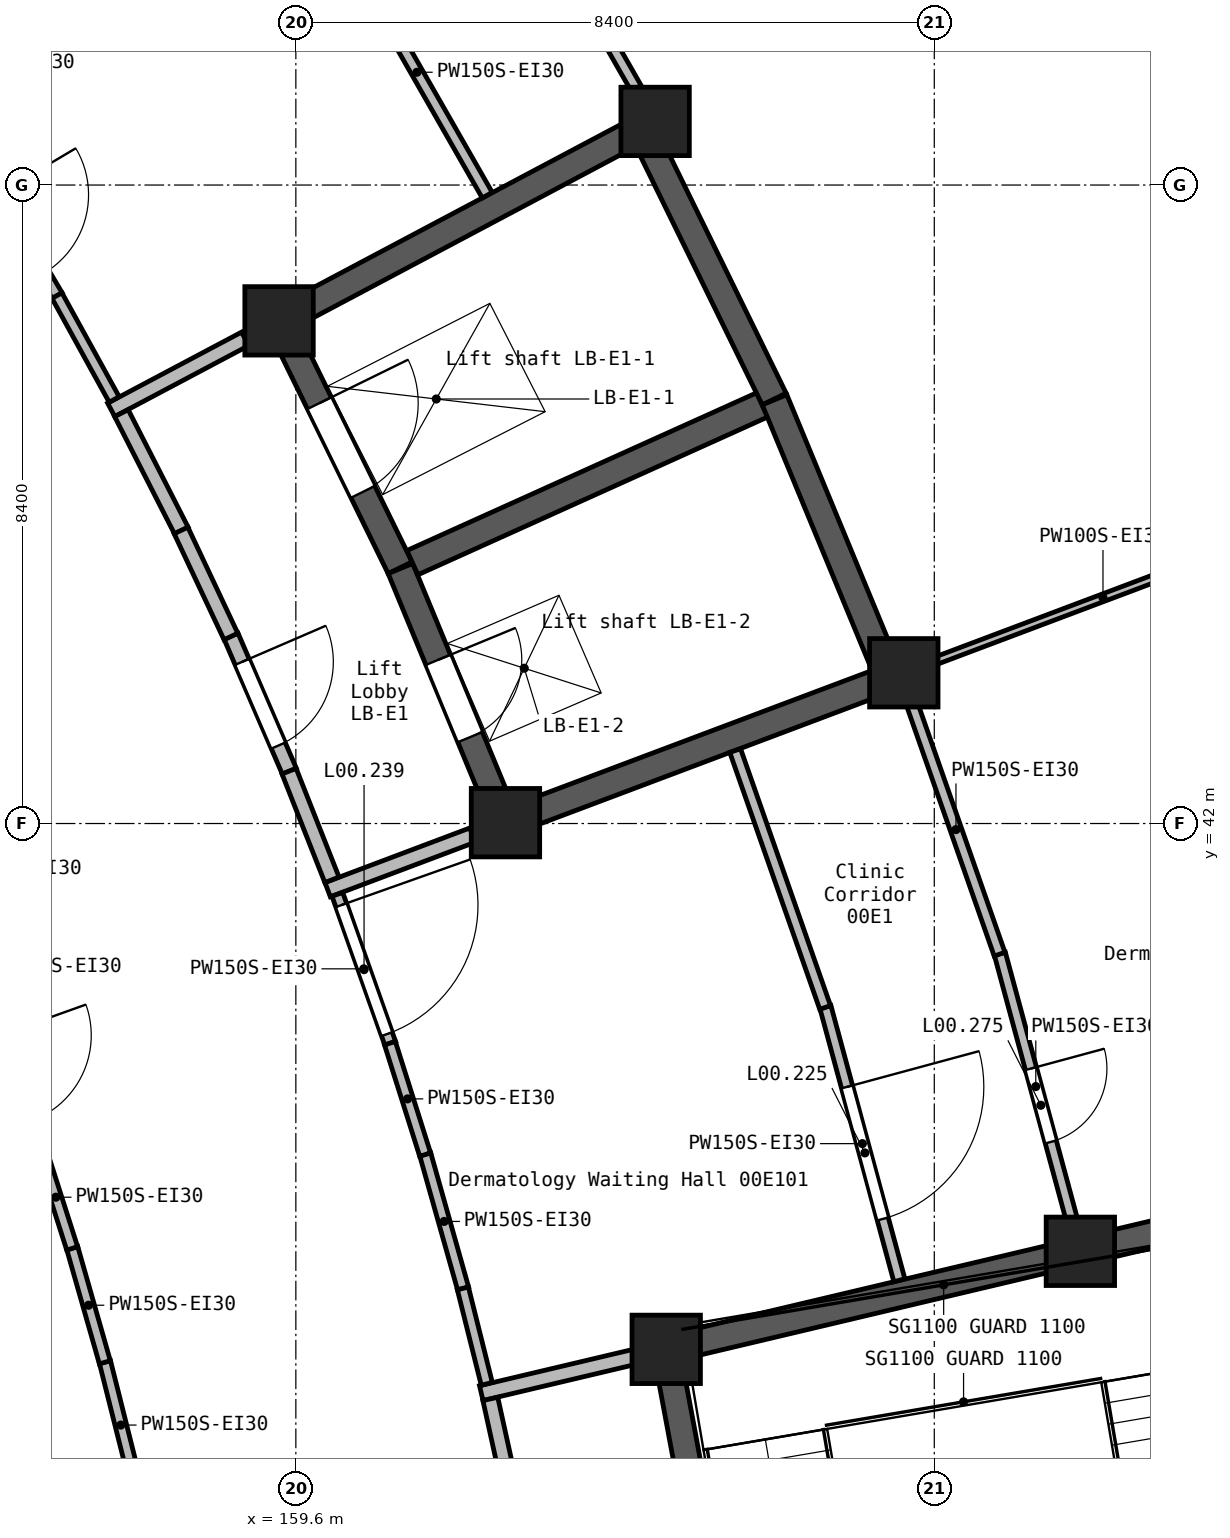
"""IFC4 building model, lengths in metres.
Left out: names, types, materials, properties, quantities, classifications, styles, units other than length and angle.
Written with IfcOpenShell. Run it as: python <this file> out.ifc"""

import sys

from ifc_helpers import new_model, si_unit, direction, frame, frame_2d, origin, origin_2d, place, context, subcontext, project, spatial, rectangle, extrude, element, fill, save


model = new_model("IFC4")
c1 = context("Model", 3, precision=1e-05, world=origin(), true_north=direction((0.0, 1.0)))
c2 = subcontext(c1, "Body", "Model", "MODEL_VIEW")
j1 = project(units=[si_unit("LENGTHUNIT", "METRE"), si_unit("PLANEANGLEUNIT", "RADIAN")], contexts=[c1])
p1 = place(None, origin())
s1 = spatial("IfcSite", under=j1, at=p1, CompositionType="ELEMENT")
p2 = place(p1, origin())
s2 = spatial("IfcBuilding", under=s1, at=p2, CompositionType="ELEMENT")
p3 = place(p2, origin())
s3 = spatial("IfcBuildingStorey", under=s2, at=p3, CompositionType="ELEMENT", Elevation=0.0)
for number, where, z_axis, x_axis in (
    (1, (159.379, 48.613, -0.3), (0.0, 0.0, 1.0), (1.0, 0.0, 0.0)),
    (2, (162.358, 42.011, -0.3), (0.0, 0.0, 1.0), (1.0, 0.0, 0.0)),
    (3, (164.327, 51.237, -0.3), (0.0, 0.0, 1.0), (1.0, 0.0, 0.0)),
    (4, (164.473, 35.082, -0.3), (0.0, 0.0, 1.0), (1.0, 0.0, 0.0)),
    (5, (167.599, 43.983, -0.3), (0.0, 0.0, 1.0), (1.0, 0.0, 0.0)),
    (6, (169.922, 36.372, -0.3), (0.0, 0.0, 1.0), (1.0, 0.0, 0.0)),
):
    element("IfcColumn", number, at=place(p3, frame(where, z_axis=z_axis, x_axis=x_axis)), inside=s3, PredefinedType="COLUMN", context=c2, shape_type="SweptSolid", body=[
        extrude(rectangle(XDim=0.9, YDim=0.9, at=origin_2d()), origin(), (0.0, 0.0, 1.0), 5.7),
    ])
p4 = place(p3, frame((159.224, 48.531, -0.3), z_axis=(0.0, 0.0, 1.0), x_axis=(0.883393138637, 0.468632652094, 0.0)))
e7 = element("IfcWall", 7, at=p4, inside=s3, PredefinedType="SHEAR", context=c2, shape_type="SweptSolid", body=[
    extrude(rectangle(XDim=5.751, YDim=0.35, at=frame_2d((2.875, 0.0))), origin(), (0.0, 0.0, 1.0), 5.7),
])
p5 = place(p3, frame((159.456, 48.456, -0.3), z_axis=(0.0, 0.0, 1.0), x_axis=(0.440221126053, -0.89788939195, 0.0)))
e8 = element("IfcWall", 8, at=p5, inside=s3, PredefinedType="SHEAR", context=c2, shape_type="SweptSolid", body=[
    extrude(rectangle(XDim=3.442, YDim=0.35, at=frame_2d((1.721, 0.0))), origin(), (0.0, 0.0, 1.0), 5.7),
])
p6 = place(p5, frame((1.031, 0.0, 0.3)))
e9 = element("IfcOpeningElement", 9, at=p6, cuts=e8, PredefinedType="OPENING", context=c2, shape_type="SweptSolid", body=[
    extrude(rectangle(XDim=1.3, YDim=2.1, at=frame_2d((0.65, 1.05))), frame((0.0, 0.185, 0.0), z_axis=(0.0, -1.0, 0.0), x_axis=(1.0, 0.0, 0.0)), (0.0, 0.0, 1.0), 0.37),
])
p7 = place(p3, frame((160.976, 45.355, -0.3), z_axis=(0.0, 0.0, 1.0), x_axis=(0.381990591944, -0.924166212143, 0.0)))
e10 = element("IfcWall", 10, at=p7, inside=s3, PredefinedType="SHEAR", context=c2, shape_type="SweptSolid", body=[
    extrude(rectangle(XDim=3.443, YDim=0.35, at=frame_2d((1.721, 0.0))), origin(), (0.0, 0.0, 1.0), 5.7),
])
p8 = place(p7, frame((1.3, 0.0, 0.3)))
e11 = element("IfcOpeningElement", 11, at=p8, cuts=e10, PredefinedType="OPENING", context=c2, shape_type="SweptSolid", body=[
    extrude(rectangle(XDim=1.1, YDim=2.1, at=frame_2d((0.55, 1.05))), frame((0.0, 0.185, 0.0), z_axis=(0.0, -1.0, 0.0), x_axis=(1.0, 0.0, 0.0)), (0.0, 0.0, 1.0), 0.37),
])
p9 = place(p3, frame((161.134, 45.432, -0.3), z_axis=(0.0, 0.0, 1.0), x_axis=(0.911564728385, 0.411156595427, 0.0)))
e12 = element("IfcWall", 12, at=p9, inside=s3, PredefinedType="SHEAR", context=c2, shape_type="SweptSolid", body=[
    extrude(rectangle(XDim=5.05, YDim=0.35, at=frame_2d((2.525, 0.0))), origin(), (0.0, 0.0, 1.0), 5.7),
])
p10 = place(p3, frame((162.194, 41.949, -0.3), z_axis=(0.0, 0.0, 1.0), x_axis=(0.935920223106, 0.352212061095, 0.0)))
e13 = element("IfcWall", 13, at=p10, inside=s3, PredefinedType="SHEAR", context=c2, shape_type="SweptSolid", body=[
    extrude(rectangle(XDim=5.75, YDim=0.35, at=frame_2d((2.875, 0.0))), origin(), (0.0, 0.0, 1.0), 5.7),
])
p11 = place(p3, frame((164.303, 35.042, -0.3), z_axis=(0.0, 0.0, 1.0), x_axis=(0.973093454504, 0.230410782737, 0.0)))
e14 = element("IfcWall", 14, at=p11, inside=s3, PredefinedType="SHEAR", context=c2, shape_type="SweptSolid", body=[
    extrude(rectangle(XDim=7.55, YDim=0.35, at=frame_2d((3.775, 0.0))), origin(), (0.0, 0.0, 1.0), 5.7),
])
p12 = place(p3, frame((165.469, 29.746, -0.3), z_axis=(0.0, 0.0, 1.0), x_axis=(-0.183471964923, 0.98302494276, 0.0)))
e15 = element("IfcWall", 15, at=p12, inside=s3, PredefinedType="SHEAR", context=c2, shape_type="SweptSolid", body=[
    extrude(rectangle(XDim=5.253, YDim=0.35, at=frame_2d((2.627, 0.0))), origin(), (0.0, 0.0, 1.0), 5.7),
])
p13 = place(p3, frame((165.894, 47.585, -0.3), z_axis=(0.0, 0.0, 1.0), x_axis=(-0.43992897418, 0.898032570499, 0.0)))
e16 = element("IfcWall", 16, at=p13, inside=s3, PredefinedType="SHEAR", context=c2, shape_type="SweptSolid", body=[
    extrude(rectangle(XDim=3.788, YDim=0.35, at=frame_2d((1.894, 0.0))), origin(), (0.0, 0.0, 1.0), 5.7),
])
p14 = place(p3, frame((167.345, 44.075, -0.3), z_axis=(0.0, 0.0, 1.0), x_axis=(-0.382046231428, 0.924143212415, 0.0)))
e17 = element("IfcWall", 17, at=p14, inside=s3, PredefinedType="SHEAR", context=c2, shape_type="SweptSolid", body=[
    extrude(rectangle(XDim=3.788, YDim=0.35, at=frame_2d((1.894, 0.0))), origin(), (0.0, 0.0, 1.0), 5.7),
])
p15 = place(p3, frame((162.04, 34.506, 0.0), z_axis=(0.0, 0.0, 1.0), x_axis=(0.973117236519, 0.230310321066, 0.0)))
e18 = element("IfcWall", 18, at=p15, inside=s3, PredefinedType="SOLIDWALL", context=c2, shape_type="SweptSolid", body=[
    extrude(rectangle(XDim=2.066, YDim=0.2, at=frame_2d((1.033, 0.0))), origin(), (0.0, 0.0, 1.0), 5.05),
])
p16 = place(p3, frame((160.018, 41.13, 0.0), z_axis=(0.0, 0.0, 1.0), x_axis=(0.935835444075, 0.352437259115, 0.0)))
e19 = element("IfcWall", 19, at=p16, inside=s3, PredefinedType="SOLIDWALL", context=c2, shape_type="SweptSolid", body=[
    extrude(rectangle(XDim=2.036, YDim=0.2, at=frame_2d((1.018, 0.0))), origin(), (0.0, 0.0, 1.0), 5.05),
])
p17 = place(p3, frame((157.171, 47.442, 0.0), z_axis=(0.0, 0.0, 1.0), x_axis=(0.883475149074, 0.468478026133, 0.0)))
e20 = element("IfcWall", 20, at=p17, inside=s3, PredefinedType="SOLIDWALL", context=c2, shape_type="SweptSolid", body=[
    extrude(rectangle(XDim=1.995, YDim=0.2, at=frame_2d((0.998, 0.0))), origin(), (0.0, 0.0, 1.0), 5.05),
])
p18 = place(p3, frame((158.747, 44.465, 0.0), z_axis=(0.0, 0.0, 1.0), x_axis=(0.396322487651, -0.918111368943, 0.0)))
e21 = element("IfcWall", 21, at=p18, inside=s3, PredefinedType="SOLIDWALL", context=c2, shape_type="SweptSolid", body=[
    extrude(rectangle(XDim=1.936, YDim=0.2, at=frame_2d((0.968, 0.0))), origin(), (0.0, 0.0, 1.0), 5.05),
])
p19 = place(p18, frame((0.368, 0.0, 0.0)))
e22 = element("IfcOpeningElement", 22, at=p19, cuts=e21, PredefinedType="OPENING", context=c2, shape_type="SweptSolid", body=[
    extrude(rectangle(XDim=1.2, YDim=2.1, at=frame_2d((0.6, 1.05))), frame((0.0, 0.11, 0.0), z_axis=(0.0, -1.0, 0.0), x_axis=(1.0, 0.0, 0.0)), (0.0, 0.0, 1.0), 0.22),
])
p20 = place(p3, frame((157.305, 47.399, 0.0), z_axis=(0.0, 0.0, 1.0), x_axis=(0.454575201636, -0.890708361955, 0.0)))
e23 = element("IfcWall", 23, at=p20, inside=s3, PredefinedType="SOLIDWALL", context=c2, shape_type="SweptSolid", body=[
    extrude(rectangle(XDim=1.734, YDim=0.2, at=frame_2d((0.867, 0.0))), origin(), (0.0, 0.0, 1.0), 5.05),
])
p21 = place(p3, frame((162.159, 34.43, 0.0), z_axis=(0.0, 0.0, 1.0), x_axis=(0.215079958229, -0.976596442533, 0.0)))
e24 = element("IfcWall", 24, at=p21, inside=s3, PredefinedType="SOLIDWALL", context=c2, shape_type="SweptSolid", body=[
    extrude(rectangle(XDim=1.537, YDim=0.2, at=frame_2d((0.769, 0.0))), origin(), (0.0, 0.0, 1.0), 5.05),
])
p22 = place(p3, frame((158.089, 45.855, 0.0), z_axis=(0.0, 0.0, 1.0), x_axis=(0.42579703633, -0.904818702201, 0.0)))
e25 = element("IfcWall", 25, at=p22, inside=s3, PredefinedType="SOLIDWALL", context=c2, shape_type="SweptSolid", body=[
    extrude(rectangle(XDim=1.541, YDim=0.2, at=frame_2d((0.771, 0.0))), origin(), (0.0, 0.0, 1.0), 5.05),
])
p23 = place(p3, frame((159.51, 42.689, 0.0), z_axis=(0.0, 0.0, 1.0), x_axis=(0.367195475631, -0.930143796773, 0.0)))
e26 = element("IfcWall", 26, at=p23, inside=s3, PredefinedType="SOLIDWALL", context=c2, shape_type="SweptSolid", body=[
    extrude(rectangle(XDim=1.537, YDim=0.2, at=frame_2d((0.768, 0.0))), origin(), (0.0, 0.0, 1.0), 5.05),
])
p24 = place(p3, frame((162.313, 54.758, 0.0), z_axis=(0.0, 0.0, 1.0), x_axis=(0.496582798362, -0.867989357291, 0.0)))
e27 = element("IfcWall", 27, at=p24, inside=s3, PredefinedType="PARTITIONING", context=c2, shape_type="SweptSolid", body=[
    extrude(rectangle(XDim=3.553, YDim=0.15, at=frame_2d((1.777, 0.0))), origin(), (0.0, 0.0, 1.0), 5.05),
])
p25 = place(p24, frame((1.566, 0.0, 0.0)))
e28 = element("IfcOpeningElement", 28, at=p25, cuts=e27, PredefinedType="OPENING", context=c2, shape_type="SweptSolid", body=[
    extrude(rectangle(XDim=1.0, YDim=2.1, at=frame_2d((0.5, 1.05))), frame((0.0, 0.085, 0.0), z_axis=(0.0, -1.0, 0.0), x_axis=(1.0, 0.0, 0.0)), (0.0, 0.0, 1.0), 0.17),
])
p26 = place(p3, frame((168.862, 40.287, 0.0), z_axis=(0.0, 0.0, 1.0), x_axis=(0.261268938462, -0.965266047157, 0.0)))
e29 = element("IfcWall", 29, at=p26, inside=s3, PredefinedType="PARTITIONING", context=c2, shape_type="SweptSolid", body=[
    extrude(rectangle(XDim=3.622, YDim=0.15, at=frame_2d((1.811, 0.0))), origin(), (0.0, 0.0, 1.0), 5.05),
])
p27 = place(p26, frame((1.566, 0.0, 0.0)))
e30 = element("IfcOpeningElement", 30, at=p27, cuts=e29, PredefinedType="OPENING", context=c2, shape_type="SweptSolid", body=[
    extrude(rectangle(XDim=1.0, YDim=2.1, at=frame_2d((0.5, 1.05))), frame((0.0, 0.085, 0.0), z_axis=(0.0, -1.0, 0.0), x_axis=(1.0, 0.0, 0.0)), (0.0, 0.0, 1.0), 0.17),
])
p28 = place(p3, frame((167.711, 43.559, 0.0), z_axis=(0.0, 0.0, 1.0), x_axis=(0.330491338893, -0.9438090246, 0.0)))
e31 = element("IfcWall", 31, at=p28, inside=s3, PredefinedType="PARTITIONING", context=c2, shape_type="SweptSolid", body=[
    extrude(rectangle(XDim=3.473, YDim=0.15, at=frame_2d((1.736, 0.0))), origin(), (0.0, 0.0, 1.0), 5.05),
])
p29 = place(p3, frame((166.567, 39.586, 0.0), z_axis=(0.0, 0.0, 1.0), x_axis=(0.261225938755, -0.965277684877, 0.0)))
e32 = element("IfcWall", 32, at=p29, inside=s3, PredefinedType="PARTITIONING", context=c2, shape_type="SweptSolid", body=[
    extrude(rectangle(XDim=3.725, YDim=0.15, at=frame_2d((1.863, 0.0))), origin(), (0.0, 0.0, 1.0), 5.05),
])
p30 = place(p29, frame((1.089, 0.0, 0.0)))
e33 = element("IfcOpeningElement", 33, at=p30, cuts=e32, PredefinedType="OPENING", context=c2, shape_type="SweptSolid", body=[
    extrude(rectangle(XDim=1.8, YDim=2.1, at=frame_2d((0.9, 1.05))), frame((0.0, 0.085, 0.0), z_axis=(0.0, -1.0, 0.0), x_axis=(1.0, 0.0, 0.0)), (0.0, 0.0, 1.0), 0.17),
])
p31 = place(p3, frame((160.269, 53.501, 0.0), z_axis=(0.0, 0.0, 1.0), x_axis=(0.496371795626, -0.8681100394, 0.0)))
e34 = element("IfcWall", 34, at=p31, inside=s3, PredefinedType="PARTITIONING", context=c2, shape_type="SweptSolid", body=[
    extrude(rectangle(XDim=3.726, YDim=0.15, at=frame_2d((1.863, 0.0))), origin(), (0.0, 0.0, 1.0), 5.05),
])
p32 = place(p3, frame((165.38, 42.96, 0.0), z_axis=(0.0, 0.0, 1.0), x_axis=(0.330508329073, -0.943803075018, 0.0)))
e35 = element("IfcWall", 35, at=p32, inside=s3, PredefinedType="PARTITIONING", context=c2, shape_type="SweptSolid", body=[
    extrude(rectangle(XDim=3.581, YDim=0.15, at=frame_2d((1.791, 0.0))), origin(), (0.0, 0.0, 1.0), 5.05),
])
p33 = place(p3, frame((160.146, 41.068, 0.0), z_axis=(0.0, 0.0, 1.0), x_axis=(0.334170983673, -0.942512468708, 0.0)))
e36 = element("IfcWall", 36, at=p33, inside=s3, PredefinedType="PARTITIONING", context=c2, shape_type="SweptSolid", body=[
    extrude(rectangle(XDim=2.079, YDim=0.15, at=frame_2d((1.04, 0.0))), origin(), (0.0, 0.0, 1.0), 5.05),
])
p34 = place(p33, frame((0.151, 0.0, 0.0)))
e37 = element("IfcOpeningElement", 37, at=p34, cuts=e36, PredefinedType="OPENING", context=c2, shape_type="SweptSolid", body=[
    extrude(rectangle(XDim=1.8, YDim=2.1, at=frame_2d((0.9, 1.05))), frame((0.0, 0.085, 0.0), z_axis=(0.0, -1.0, 0.0), x_axis=(1.0, 0.0, 0.0)), (0.0, 0.0, 1.0), 0.17),
])
p35 = place(p3, frame((155.498, 50.566, 0.0), z_axis=(0.0, 0.0, 1.0), x_axis=(0.510320389621, -0.859984360287, 0.0)))
e38 = element("IfcWall", 38, at=p35, inside=s3, PredefinedType="PARTITIONING", context=c2, shape_type="SweptSolid", body=[
    extrude(rectangle(XDim=1.886, YDim=0.15, at=frame_2d((0.943, 0.0))), origin(), (0.0, 0.0, 1.0), 5.05),
])
p36 = place(p35, frame((0.343, 0.0, 0.0)))
e39 = element("IfcOpeningElement", 39, at=p36, cuts=e38, PredefinedType="OPENING", context=c2, shape_type="SweptSolid", body=[
    extrude(rectangle(XDim=1.2, YDim=2.1, at=frame_2d((0.6, 1.05))), frame((0.0, 0.085, 0.0), z_axis=(0.0, -1.0, 0.0), x_axis=(1.0, 0.0, 0.0)), (0.0, 0.0, 1.0), 0.17),
])
p37 = place(p3, frame((156.457, 48.945, 0.0), z_axis=(0.0, 0.0, 1.0), x_axis=(0.482411223267, -0.875944867937, 0.0)))
e40 = element("IfcWall", 40, at=p37, inside=s3, PredefinedType="PARTITIONING", context=c2, shape_type="SweptSolid", body=[
    extrude(rectangle(XDim=1.56, YDim=0.15, at=frame_2d((0.78, 0.0))), origin(), (0.0, 0.0, 1.0), 5.05),
])
p38 = place(p3, frame((161.302, 37.647, 0.0), z_axis=(0.0, 0.0, 1.0), x_axis=(0.271536076628, -0.962428261789, 0.0)))
e41 = element("IfcWall", 41, at=p38, inside=s3, PredefinedType="PARTITIONING", context=c2, shape_type="SweptSolid", body=[
    extrude(rectangle(XDim=1.833, YDim=0.15, at=frame_2d((0.917, 0.0))), origin(), (0.0, 0.0, 1.0), 5.05),
])
p39 = place(p3, frame((160.838, 39.11, 0.0), z_axis=(0.0, 0.0, 1.0), x_axis=(0.301321411033, -0.953522630698, 0.0)))
e42 = element("IfcWall", 42, at=p39, inside=s3, PredefinedType="PARTITIONING", context=c2, shape_type="SweptSolid", body=[
    extrude(rectangle(XDim=1.537, YDim=0.15, at=frame_2d((0.769, 0.0))), origin(), (0.0, 0.0, 1.0), 5.05),
])
p40 = place(p3, frame((157.089, 34.915, 0.0), z_axis=(0.0, 0.0, 1.0), x_axis=(0.243846269547, -0.969813898038, 0.0)))
e43 = element("IfcWall", 43, at=p40, inside=s3, PredefinedType="PARTITIONING", context=c2, shape_type="SweptSolid", body=[
    extrude(rectangle(XDim=1.709, YDim=0.15, at=frame_2d((0.854, 0.0))), origin(), (0.0, 0.0, 1.0), 5.05),
])
p41 = place(p3, frame((156.658, 36.413, 0.0), z_axis=(0.0, 0.0, 1.0), x_axis=(0.27445261009, -0.961600626463, 0.0)))
e44 = element("IfcWall", 44, at=p41, inside=s3, PredefinedType="PARTITIONING", context=c2, shape_type="SweptSolid", body=[
    extrude(rectangle(XDim=1.561, YDim=0.15, at=frame_2d((0.781, 0.0))), origin(), (0.0, 0.0, 1.0), 5.05),
])
p42 = place(p3, frame((156.227, 37.757, 0.0), z_axis=(0.0, 0.0, 1.0), x_axis=(0.304180257637, -0.95261449226, 0.0)))
e45 = element("IfcWall", 45, at=p42, inside=s3, PredefinedType="PARTITIONING", context=c2, shape_type="SweptSolid", body=[
    extrude(rectangle(XDim=1.413, YDim=0.15, at=frame_2d((0.707, 0.0))), origin(), (0.0, 0.0, 1.0), 5.05),
])
p43 = place(p3, frame((161.798, 35.884, 0.0), z_axis=(0.0, 0.0, 1.0), x_axis=(0.243023571224, -0.970020383203, 0.0)))
e46 = element("IfcWall", 46, at=p43, inside=s3, PredefinedType="PARTITIONING", context=c2, shape_type="SweptSolid", body=[
    extrude(rectangle(XDim=1.295, YDim=0.15, at=frame_2d((0.647, 0.0))), origin(), (0.0, 0.0, 1.0), 5.05),
])
p44 = place(p3, frame((168.016, 44.14, 0.0), z_axis=(0.0, 0.0, 1.0), x_axis=(0.935850976525, 0.352396012659, 0.0)))
e47 = element("IfcWall", 47, at=p44, inside=s3, PredefinedType="PARTITIONING", context=c2, shape_type="SweptSolid", body=[
    extrude(rectangle(XDim=4.708, YDim=0.1, at=frame_2d((2.354, 0.0))), origin(), (0.0, 0.0, 1.0), 5.05),
])
p45 = place(p30, origin())
e48 = element("IfcDoor", 48, at=p45, inside=s3, OperationType="DOUBLE_DOOR_SINGLE_SWING", PredefinedType="DOOR", context=c2, shape_type="SweptSolid", body=[
    extrude(rectangle(XDim=1.8, YDim=2.1, at=frame_2d((0.9, 1.05))), frame((0.0, 0.025, 0.0), z_axis=(0.0, -1.0, 0.0), x_axis=(1.0, 0.0, 0.0)), (0.0, 0.0, 1.0), 0.05),
])
fill(e33, e48)
p46 = place(p19, origin())
e49 = element("IfcDoor", 49, at=p46, inside=s3, OperationType="SINGLE_SWING_LEFT", PredefinedType="DOOR", context=c2, shape_type="SweptSolid", body=[
    extrude(rectangle(XDim=1.2, YDim=2.1, at=frame_2d((0.6, 1.05))), frame((0.0, 0.025, 0.0), z_axis=(0.0, -1.0, 0.0), x_axis=(1.0, 0.0, 0.0)), (0.0, 0.0, 1.0), 0.05),
])
fill(e22, e49)
p47 = place(p34, frame((1.8, 0.0, 0.0), z_axis=(0.0, 0.0, 1.0), x_axis=(-1.0, 0.0, 0.0)))
e50 = element("IfcDoor", 50, at=p47, inside=s3, OperationType="DOUBLE_DOOR_SINGLE_SWING", PredefinedType="DOOR", context=c2, shape_type="SweptSolid", body=[
    extrude(rectangle(XDim=1.8, YDim=2.1, at=frame_2d((0.9, 1.05))), frame((0.0, 0.025, 0.0), z_axis=(0.0, -1.0, 0.0), x_axis=(1.0, 0.0, 0.0)), (0.0, 0.0, 1.0), 0.05),
])
fill(e37, e50)
p48 = place(p27, origin())
e51 = element("IfcDoor", 51, at=p48, inside=s3, OperationType="SINGLE_SWING_RIGHT", PredefinedType="DOOR", context=c2, shape_type="SweptSolid", body=[
    extrude(rectangle(XDim=1.0, YDim=2.1, at=frame_2d((0.5, 1.05))), frame((0.0, 0.025, 0.0), z_axis=(0.0, -1.0, 0.0), x_axis=(1.0, 0.0, 0.0)), (0.0, 0.0, 1.0), 0.05),
])
fill(e30, e51)
p49 = place(p6, origin())
e52 = element("IfcDoor", 52, at=p49, inside=s3, OperationType="DOUBLE_DOOR_SLIDING", PredefinedType="DOOR", context=c2, shape_type="SweptSolid", body=[
    extrude(rectangle(XDim=1.3, YDim=2.1, at=frame_2d((0.65, 1.05))), frame((0.0, 0.025, 0.0), z_axis=(0.0, -1.0, 0.0), x_axis=(1.0, 0.0, 0.0)), (0.0, 0.0, 1.0), 0.05),
])
fill(e9, e52)
p50 = place(p8, origin())
e53 = element("IfcDoor", 53, at=p50, inside=s3, OperationType="DOUBLE_DOOR_SLIDING", PredefinedType="DOOR", context=c2, shape_type="SweptSolid", body=[
    extrude(rectangle(XDim=1.1, YDim=2.1, at=frame_2d((0.55, 1.05))), frame((0.0, 0.025, 0.0), z_axis=(0.0, -1.0, 0.0), x_axis=(1.0, 0.0, 0.0)), (0.0, 0.0, 1.0), 0.05),
])
fill(e11, e53)
save(model, sys.argv[1])
